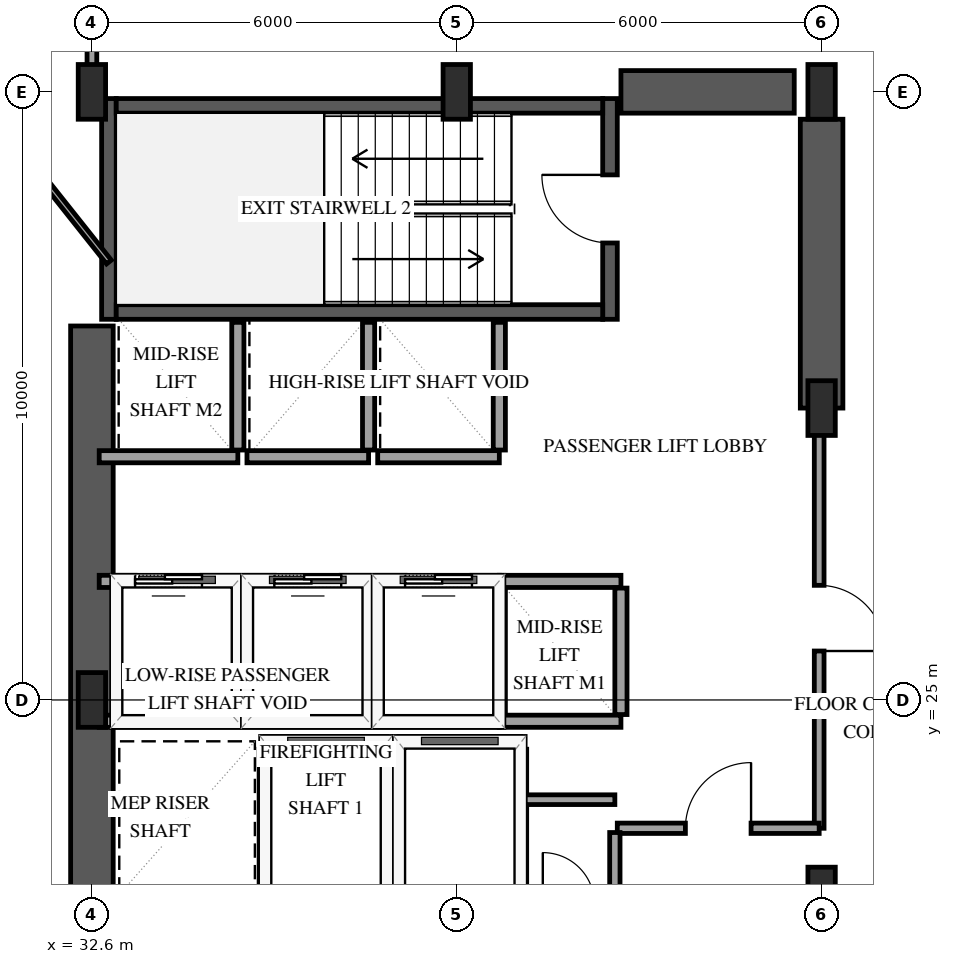
"""IFC4 building model, lengths in metres.
Left out: names, types, materials, properties, quantities, classifications, styles, units other than length and angle.
Written with IfcOpenShell. Run it as: python <this file> out.ifc"""

import sys

from ifc_helpers import new_model, si_unit, direction, frame, frame_2d, origin, origin_2d, place, context, subcontext, project, spatial, rectangle, extrude, element, fill, save


model = new_model("IFC4")
c1 = context("Model", 3, precision=1e-05, world=origin(), true_north=direction((0.0, 1.0)))
c2 = subcontext(c1, "Body", "Model", "MODEL_VIEW")
j1 = project(units=[si_unit("LENGTHUNIT", "METRE"), si_unit("PLANEANGLEUNIT", "RADIAN")], contexts=[c1])
p1 = place(None, origin())
s1 = spatial("IfcSite", under=j1, at=p1, CompositionType="ELEMENT")
p2 = place(p1, origin())
s2 = spatial("IfcBuilding", under=s1, at=p2, CompositionType="ELEMENT")
p3 = place(p2, frame((0.0, 0.0, 50.6)))
s3 = spatial("IfcBuildingStorey", under=s2, at=p3, CompositionType="ELEMENT", Elevation=50.6)
p4 = place(p3, frame((32.88, 31.26, 0.0), z_axis=(0.0, 0.0, 1.0), x_axis=(0.0, 1.0, 0.0)))
e1 = element("IfcWall", 1, at=p4, inside=s3, PredefinedType="SHEAR", context=c2, shape_type="SweptSolid", body=[
    extrude(rectangle(XDim=3.63, YDim=0.24, at=frame_2d((1.815, 0.0))), origin(), (0.0, 0.0, 1.0), 4.0),
])
p5 = place(p3, frame((41.12, 31.26, 0.0), z_axis=(0.0, 0.0, 1.0), x_axis=(0.0, 1.0, 0.0)))
e2 = element("IfcWall", 2, at=p5, inside=s3, PredefinedType="SHEAR", context=c2, shape_type="SweptSolid", body=[
    extrude(rectangle(XDim=3.63, YDim=0.24, at=frame_2d((1.815, 0.0))), origin(), (0.0, 0.0, 1.0), 4.0),
])
p6 = place(p5, frame((1.255, 0.0, 0.0)))
e3 = element("IfcOpeningElement", 3, at=p6, cuts=e2, PredefinedType="OPENING", context=c2, shape_type="SweptSolid", body=[
    extrude(rectangle(XDim=1.12, YDim=2.15, at=frame_2d((0.56, 1.075))), frame((0.0, 0.13, 0.0), z_axis=(0.0, -1.0, 0.0), x_axis=(1.0, 0.0, 0.0)), (0.0, 0.0, 1.0), 0.26),
])
for number, where, z_axis, x_axis in (
    (4, (33.0, 31.38, 0.0), (0.0, 0.0, 1.0), (1.0, 0.0, 0.0)),
    (5, (33.0, 34.77, 0.0), (0.0, 0.0, 1.0), (1.0, 0.0, 0.0)),
):
    element("IfcWall", number, at=place(p3, frame(where, z_axis=z_axis, x_axis=x_axis)), inside=s3, PredefinedType="SHEAR", context=c2, shape_type="SweptSolid", body=[
        extrude(rectangle(XDim=8.0, YDim=0.24, at=frame_2d((4.0, 0.0))), origin(), (0.0, 0.0, 1.0), 4.0),
    ])
p7 = place(p3, frame((32.6, 18.85, 0.0), z_axis=(0.0, 0.0, 1.0), x_axis=(0.0, 1.0, 0.0)))
e6 = element("IfcWall", 6, at=p7, inside=s3, PredefinedType="SHEAR", context=c2, shape_type="SweptSolid", body=[
    extrude(rectangle(XDim=12.3, YDim=0.7, at=frame_2d((6.15, 0.0))), origin(), (0.0, 0.0, 1.0), 4.0),
])
p8 = place(p3, frame((41.3, 35.0, 0.0), z_axis=(0.0, 0.0, 1.0), x_axis=(1.0, 0.0, 0.0)))
e7 = element("IfcWall", 7, at=p8, inside=s3, PredefinedType="SHEAR", context=c2, shape_type="SweptSolid", body=[
    extrude(rectangle(XDim=2.85, YDim=0.7, at=frame_2d((1.425, 0.0))), origin(), (0.0, 0.0, 1.0), 4.0),
])
p9 = place(p3, frame((44.6, 29.8, 0.0), z_axis=(0.0, 0.0, 1.0), x_axis=(0.0, 1.0, 0.0)))
e8 = element("IfcWall", 8, at=p9, inside=s3, PredefinedType="SHEAR", context=c2, shape_type="SweptSolid", body=[
    extrude(rectangle(XDim=4.75, YDim=0.7, at=frame_2d((2.375, 0.0))), origin(), (0.0, 0.0, 1.0), 4.0),
])
for number, where, z_axis, x_axis in (
    (9, (32.6, 25.0, 0.0), (0.0, 0.0, 1.0), (1.0, 0.0, 0.0)),
    (10, (32.6, 35.0, 0.0), (0.0, 0.0, 1.0), (1.0, 0.0, 0.0)),
    (11, (38.6, 35.0, 0.0), (0.0, 0.0, 1.0), (1.0, 0.0, 0.0)),
    (12, (44.6, 21.8, 0.0), (0.0, 0.0, 1.0), (1.0, 0.0, 0.0)),
    (13, (44.6, 29.8, 0.0), (0.0, 0.0, 1.0), (1.0, 0.0, 0.0)),
    (14, (44.6, 35.0, 0.0), (0.0, 0.0, 1.0), (1.0, 0.0, 0.0)),
):
    element("IfcColumn", number, at=place(p3, frame(where, z_axis=z_axis, x_axis=x_axis)), inside=s3, PredefinedType="PILASTER", context=c2, shape_type="SweptSolid", body=[
        extrude(rectangle(XDim=0.45, YDim=0.9, at=origin_2d()), origin(), (0.0, 0.0, 1.0), 4.0),
    ])
p10 = place(p3, frame((35.45, 24.3, 0.0), z_axis=(0.0, 0.0, 1.0), x_axis=(1.0, 0.0, 0.0)))
e15 = element("IfcWall", 15, at=p10, inside=s3, PredefinedType="SOLIDWALL", context=c2, shape_type="SweptSolid", body=[
    extrude(rectangle(XDim=2.0, YDim=0.2, at=frame_2d((1.0, 0.0))), origin(), (0.0, 0.0, 1.0), 3.7),
])
for number, where, z_axis, x_axis in (
    (16, (35.45, 21.81, 0.0), (0.0, 0.0, 1.0), (0.0, 1.0, 0.0)),
    (17, (37.45, 21.81, 0.0), (0.0, 0.0, 1.0), (0.0, 1.0, 0.0)),
):
    element("IfcWall", number, at=place(p3, frame(where, z_axis=z_axis, x_axis=x_axis)), inside=s3, PredefinedType="SOLIDWALL", context=c2, shape_type="SweptSolid", body=[
        extrude(rectangle(XDim=2.38, YDim=0.2, at=frame_2d((1.19, 0.0))), origin(), (0.0, 0.0, 1.0), 3.7),
    ])
p11 = place(p3, frame((37.65, 24.3, 0.0), z_axis=(0.0, 0.0, 1.0), x_axis=(1.0, 0.0, 0.0)))
e18 = element("IfcWall", 18, at=p11, inside=s3, PredefinedType="SOLIDWALL", context=c2, shape_type="SweptSolid", body=[
    extrude(rectangle(XDim=2.0, YDim=0.2, at=frame_2d((1.0, 0.0))), origin(), (0.0, 0.0, 1.0), 3.7),
])
p12 = place(p3, frame((39.65, 21.81, 0.0), z_axis=(0.0, 0.0, 1.0), x_axis=(0.0, 1.0, 0.0)))
e19 = element("IfcWall", 19, at=p12, inside=s3, PredefinedType="SOLIDWALL", context=c2, shape_type="SweptSolid", body=[
    extrude(rectangle(XDim=2.38, YDim=0.2, at=frame_2d((1.19, 0.0))), origin(), (0.0, 0.0, 1.0), 3.7),
])
p13 = place(p3, frame((32.72, 24.65, 0.0), z_axis=(0.0, 0.0, 1.0), x_axis=(1.0, 0.0, 0.0)))
e20 = element("IfcWall", 20, at=p13, inside=s3, PredefinedType="SOLIDWALL", context=c2, shape_type="SweptSolid", body=[
    extrude(rectangle(XDim=2.28, YDim=0.2, at=frame_2d((1.14, 0.0))), origin(), (0.0, 0.0, 1.0), 3.7),
])
p14 = place(p3, frame((32.72, 26.95, 0.0), z_axis=(0.0, 0.0, 1.0), x_axis=(1.0, 0.0, 0.0)))
e21 = element("IfcWall", 21, at=p14, inside=s3, PredefinedType="SOLIDWALL", context=c2, shape_type="SweptSolid", body=[
    extrude(rectangle(XDim=2.28, YDim=0.2, at=frame_2d((1.14, 0.0))), origin(), (0.0, 0.0, 1.0), 3.7),
])
p15 = place(p14, frame((0.59, 0.0, 0.0)))
e22 = element("IfcOpeningElement", 22, at=p15, cuts=e21, PredefinedType="OPENING", context=c2, shape_type="SweptSolid", body=[
    extrude(rectangle(XDim=1.1, YDim=2.15, at=frame_2d((0.55, 1.075))), frame((0.0, 0.11, 0.0), z_axis=(0.0, -1.0, 0.0), x_axis=(1.0, 0.0, 0.0)), (0.0, 0.0, 1.0), 0.22),
])
p16 = place(p3, frame((35.0, 24.76, 0.0), z_axis=(0.0, 0.0, 1.0), x_axis=(0.0, 1.0, 0.0)))
e23 = element("IfcWall", 23, at=p16, inside=s3, PredefinedType="SOLIDWALL", context=c2, shape_type="SweptSolid", body=[
    extrude(rectangle(XDim=2.08, YDim=0.2, at=frame_2d((1.04, 0.0))), origin(), (0.0, 0.0, 1.0), 3.7),
])
p17 = place(p3, frame((35.15, 24.65, 0.0), z_axis=(0.0, 0.0, 1.0), x_axis=(1.0, 0.0, 0.0)))
e24 = element("IfcWall", 24, at=p17, inside=s3, PredefinedType="SOLIDWALL", context=c2, shape_type="SweptSolid", body=[
    extrude(rectangle(XDim=2.0, YDim=0.2, at=frame_2d((1.0, 0.0))), origin(), (0.0, 0.0, 1.0), 3.7),
])
p18 = place(p3, frame((35.15, 26.95, 0.0), z_axis=(0.0, 0.0, 1.0), x_axis=(1.0, 0.0, 0.0)))
e25 = element("IfcWall", 25, at=p18, inside=s3, PredefinedType="SOLIDWALL", context=c2, shape_type="SweptSolid", body=[
    extrude(rectangle(XDim=2.0, YDim=0.2, at=frame_2d((1.0, 0.0))), origin(), (0.0, 0.0, 1.0), 3.7),
])
p19 = place(p18, frame((0.45, 0.0, 0.0)))
e26 = element("IfcOpeningElement", 26, at=p19, cuts=e25, PredefinedType="OPENING", context=c2, shape_type="SweptSolid", body=[
    extrude(rectangle(XDim=1.1, YDim=2.15, at=frame_2d((0.55, 1.075))), frame((0.0, 0.11, 0.0), z_axis=(0.0, -1.0, 0.0), x_axis=(1.0, 0.0, 0.0)), (0.0, 0.0, 1.0), 0.22),
])
p20 = place(p3, frame((37.15, 24.76, 0.0), z_axis=(0.0, 0.0, 1.0), x_axis=(0.0, 1.0, 0.0)))
e27 = element("IfcWall", 27, at=p20, inside=s3, PredefinedType="SOLIDWALL", context=c2, shape_type="SweptSolid", body=[
    extrude(rectangle(XDim=2.08, YDim=0.2, at=frame_2d((1.04, 0.0))), origin(), (0.0, 0.0, 1.0), 3.7),
])
p21 = place(p3, frame((37.3, 24.65, 0.0), z_axis=(0.0, 0.0, 1.0), x_axis=(1.0, 0.0, 0.0)))
e28 = element("IfcWall", 28, at=p21, inside=s3, PredefinedType="SOLIDWALL", context=c2, shape_type="SweptSolid", body=[
    extrude(rectangle(XDim=2.0, YDim=0.2, at=frame_2d((1.0, 0.0))), origin(), (0.0, 0.0, 1.0), 3.7),
])
p22 = place(p3, frame((37.3, 26.95, 0.0), z_axis=(0.0, 0.0, 1.0), x_axis=(1.0, 0.0, 0.0)))
e29 = element("IfcWall", 29, at=p22, inside=s3, PredefinedType="SOLIDWALL", context=c2, shape_type="SweptSolid", body=[
    extrude(rectangle(XDim=2.0, YDim=0.2, at=frame_2d((1.0, 0.0))), origin(), (0.0, 0.0, 1.0), 3.7),
])
p23 = place(p22, frame((0.45, 0.0, 0.0)))
e30 = element("IfcOpeningElement", 30, at=p23, cuts=e29, PredefinedType="OPENING", context=c2, shape_type="SweptSolid", body=[
    extrude(rectangle(XDim=1.1, YDim=2.15, at=frame_2d((0.55, 1.075))), frame((0.0, 0.11, 0.0), z_axis=(0.0, -1.0, 0.0), x_axis=(1.0, 0.0, 0.0)), (0.0, 0.0, 1.0), 0.22),
])
p24 = place(p3, frame((39.3, 24.76, 0.0), z_axis=(0.0, 0.0, 1.0), x_axis=(0.0, 1.0, 0.0)))
e31 = element("IfcWall", 31, at=p24, inside=s3, PredefinedType="SOLIDWALL", context=c2, shape_type="SweptSolid", body=[
    extrude(rectangle(XDim=2.08, YDim=0.2, at=frame_2d((1.04, 0.0))), origin(), (0.0, 0.0, 1.0), 3.7),
])
for number, where, z_axis, x_axis in (
    (32, (39.3, 24.65, 0.0), (0.0, 0.0, 1.0), (1.0, 0.0, 0.0)),
    (33, (39.3, 26.95, 0.0), (0.0, 0.0, 1.0), (1.0, 0.0, 0.0)),
):
    element("IfcWall", number, at=place(p3, frame(where, z_axis=z_axis, x_axis=x_axis)), inside=s3, PredefinedType="SOLIDWALL", context=c2, shape_type="SweptSolid", body=[
        extrude(rectangle(XDim=2.0, YDim=0.2, at=frame_2d((1.0, 0.0))), origin(), (0.0, 0.0, 1.0), 3.7),
    ])
p25 = place(p3, frame((41.3, 24.76, 0.0), z_axis=(0.0, 0.0, 1.0), x_axis=(0.0, 1.0, 0.0)))
e34 = element("IfcWall", 34, at=p25, inside=s3, PredefinedType="SOLIDWALL", context=c2, shape_type="SweptSolid", body=[
    extrude(rectangle(XDim=2.08, YDim=0.2, at=frame_2d((1.04, 0.0))), origin(), (0.0, 0.0, 1.0), 3.7),
])
p26 = place(p3, frame((32.72, 29.0, 0.0), z_axis=(0.0, 0.0, 1.0), x_axis=(1.0, 0.0, 0.0)))
e35 = element("IfcWall", 35, at=p26, inside=s3, PredefinedType="SOLIDWALL", context=c2, shape_type="SweptSolid", body=[
    extrude(rectangle(XDim=2.28, YDim=0.2, at=frame_2d((1.14, 0.0))), origin(), (0.0, 0.0, 1.0), 3.7),
])
p27 = place(p3, frame((35.0, 29.11, 0.0), z_axis=(0.0, 0.0, 1.0), x_axis=(0.0, 1.0, 0.0)))
e36 = element("IfcWall", 36, at=p27, inside=s3, PredefinedType="SOLIDWALL", context=c2, shape_type="SweptSolid", body=[
    extrude(rectangle(XDim=2.1, YDim=0.2, at=frame_2d((1.05, 0.0))), origin(), (0.0, 0.0, 1.0), 3.7),
])
p28 = place(p3, frame((35.15, 29.0, 0.0), z_axis=(0.0, 0.0, 1.0), x_axis=(1.0, 0.0, 0.0)))
e37 = element("IfcWall", 37, at=p28, inside=s3, PredefinedType="SOLIDWALL", context=c2, shape_type="SweptSolid", body=[
    extrude(rectangle(XDim=2.0, YDim=0.2, at=frame_2d((1.0, 0.0))), origin(), (0.0, 0.0, 1.0), 3.7),
])
p29 = place(p3, frame((37.15, 29.11, 0.0), z_axis=(0.0, 0.0, 1.0), x_axis=(0.0, 1.0, 0.0)))
e38 = element("IfcWall", 38, at=p29, inside=s3, PredefinedType="SOLIDWALL", context=c2, shape_type="SweptSolid", body=[
    extrude(rectangle(XDim=2.1, YDim=0.2, at=frame_2d((1.05, 0.0))), origin(), (0.0, 0.0, 1.0), 3.7),
])
p30 = place(p3, frame((37.3, 29.0, 0.0), z_axis=(0.0, 0.0, 1.0), x_axis=(1.0, 0.0, 0.0)))
e39 = element("IfcWall", 39, at=p30, inside=s3, PredefinedType="SOLIDWALL", context=c2, shape_type="SweptSolid", body=[
    extrude(rectangle(XDim=2.0, YDim=0.2, at=frame_2d((1.0, 0.0))), origin(), (0.0, 0.0, 1.0), 3.7),
])
p31 = place(p3, frame((39.3, 29.11, 0.0), z_axis=(0.0, 0.0, 1.0), x_axis=(0.0, 1.0, 0.0)))
e40 = element("IfcWall", 40, at=p31, inside=s3, PredefinedType="SOLIDWALL", context=c2, shape_type="SweptSolid", body=[
    extrude(rectangle(XDim=2.1, YDim=0.2, at=frame_2d((1.05, 0.0))), origin(), (0.0, 0.0, 1.0), 3.7),
])
p32 = place(p3, frame((32.88, 32.202, 0.0), z_axis=(0.0, 0.0, 1.0), x_axis=(-0.621908178435, 0.783090172072, 0.0)))
e41 = element("IfcWall", 41, at=p32, inside=s3, PredefinedType="PARTITIONING", context=c2, shape_type="SweptSolid", body=[
    extrude(rectangle(XDim=7.104, YDim=0.1, at=frame_2d((3.552, 0.0))), origin(), (0.0, 0.0, 1.0), 3.7),
])
p33 = place(p3, frame((44.56, 29.8, 0.0), z_axis=(0.0, 0.0, 1.0), x_axis=(0.0, -1.0, 0.0)))
e42 = element("IfcWall", 42, at=p33, inside=s3, PredefinedType="PARTITIONING", context=c2, shape_type="SweptSolid", body=[
    extrude(rectangle(XDim=6.91, YDim=0.16, at=frame_2d((3.455, 0.0))), origin(), (0.0, 0.0, 1.0), 2.74),
])
p34 = place(p33, frame((2.915, 0.0, 0.0)))
e43 = element("IfcOpeningElement", 43, at=p34, cuts=e42, PredefinedType="OPENING", context=c2, shape_type="SweptSolid", body=[
    extrude(rectangle(XDim=1.08, YDim=2.15, at=frame_2d((0.54, 1.075))), frame((0.0, 0.09, 0.0), z_axis=(0.0, -1.0, 0.0), x_axis=(1.0, 0.0, 0.0)), (0.0, 0.0, 1.0), 0.18),
])
p35 = place(p3, frame((41.24, 22.89, 0.0), z_axis=(0.0, 0.0, 1.0), x_axis=(1.0, 0.0, 0.0)))
e44 = element("IfcWall", 44, at=p35, inside=s3, PredefinedType="PARTITIONING", context=c2, shape_type="SweptSolid", body=[
    extrude(rectangle(XDim=3.32, YDim=0.17, at=frame_2d((1.66, 0.0))), origin(), (0.0, 0.0, 1.0), 3.7),
])
p36 = place(p35, frame((1.12, 0.0, 0.0)))
e45 = element("IfcOpeningElement", 45, at=p36, cuts=e44, PredefinedType="OPENING", context=c2, shape_type="SweptSolid", body=[
    extrude(rectangle(XDim=1.08, YDim=2.15, at=frame_2d((0.54, 1.075))), frame((0.0, 0.095, 0.0), z_axis=(0.0, -1.0, 0.0), x_axis=(1.0, 0.0, 0.0)), (0.0, 0.0, 1.0), 0.19),
])
p37 = place(p3, frame((32.6, 35.07, 0.0), z_axis=(0.0, 0.0, 1.0), x_axis=(0.0, 1.0, 0.0)))
e46 = element("IfcWall", 46, at=p37, inside=s3, PredefinedType="PARTITIONING", context=c2, shape_type="SweptSolid", body=[
    extrude(rectangle(XDim=1.91, YDim=0.16, at=frame_2d((0.955, 0.0))), origin(), (0.0, 0.0, 1.0), 3.7),
])
p38 = place(p3, frame((41.2, 21.7, 0.0), z_axis=(0.0, 0.0, 1.0), x_axis=(0.0, 1.0, 0.0)))
e47 = element("IfcWall", 47, at=p38, inside=s3, PredefinedType="PARTITIONING", context=c2, shape_type="SweptSolid", body=[
    extrude(rectangle(XDim=1.12, YDim=0.17, at=frame_2d((0.56, 0.0))), origin(), (0.0, 0.0, 1.0), 3.7),
])
p39 = place(p3, frame((41.2, 23.36, 0.0), z_axis=(0.0, 0.0, 1.0), x_axis=(-1.0, 0.0, 0.0)))
e48 = element("IfcWall", 48, at=p39, inside=s3, PredefinedType="PARTITIONING", context=c2, shape_type="SweptSolid", body=[
    extrude(rectangle(XDim=1.48, YDim=0.16, at=frame_2d((0.74, 0.0))), origin(), (0.0, 0.0, 1.0), 3.7),
])
p40 = place(p15, origin())
e49 = element("IfcDoor", 49, at=p40, inside=s3, OperationType="SLIDING_TO_LEFT", PredefinedType="DOOR", context=c2, shape_type="SweptSolid", body=[
    extrude(rectangle(XDim=1.1, YDim=2.15, at=frame_2d((0.55, 1.075))), frame((0.0, 0.025, 0.0), z_axis=(0.0, -1.0, 0.0), x_axis=(1.0, 0.0, 0.0)), (0.0, 0.0, 1.0), 0.05),
])
fill(e22, e49)
p41 = place(p19, origin())
e50 = element("IfcDoor", 50, at=p41, inside=s3, OperationType="SLIDING_TO_LEFT", PredefinedType="DOOR", context=c2, shape_type="SweptSolid", body=[
    extrude(rectangle(XDim=1.1, YDim=2.15, at=frame_2d((0.55, 1.075))), frame((0.0, 0.025, 0.0), z_axis=(0.0, -1.0, 0.0), x_axis=(1.0, 0.0, 0.0)), (0.0, 0.0, 1.0), 0.05),
])
fill(e26, e50)
p42 = place(p23, origin())
e51 = element("IfcDoor", 51, at=p42, inside=s3, OperationType="SLIDING_TO_LEFT", PredefinedType="DOOR", context=c2, shape_type="SweptSolid", body=[
    extrude(rectangle(XDim=1.1, YDim=2.15, at=frame_2d((0.55, 1.075))), frame((0.0, 0.025, 0.0), z_axis=(0.0, -1.0, 0.0), x_axis=(1.0, 0.0, 0.0)), (0.0, 0.0, 1.0), 0.05),
])
fill(e30, e51)
p43 = place(p6, origin())
e52 = element("IfcDoor", 52, at=p43, inside=s3, OperationType="SINGLE_SWING_RIGHT", PredefinedType="DOOR", context=c2, shape_type="SweptSolid", body=[
    extrude(rectangle(XDim=1.12, YDim=2.15, at=frame_2d((0.56, 1.075))), frame((0.0, 0.025, 0.0), z_axis=(0.0, -1.0, 0.0), x_axis=(1.0, 0.0, 0.0)), (0.0, 0.0, 1.0), 0.05),
])
fill(e3, e52)
p44 = place(p34, origin())
e53 = element("IfcDoor", 53, at=p44, inside=s3, OperationType="SINGLE_SWING_RIGHT", PredefinedType="DOOR", context=c2, shape_type="SweptSolid", body=[
    extrude(rectangle(XDim=1.08, YDim=2.15, at=frame_2d((0.54, 1.075))), frame((0.0, 0.025, 0.0), z_axis=(0.0, -1.0, 0.0), x_axis=(1.0, 0.0, 0.0)), (0.0, 0.0, 1.0), 0.05),
])
fill(e43, e53)
p45 = place(p36, origin())
e54 = element("IfcDoor", 54, at=p45, inside=s3, OperationType="SINGLE_SWING_RIGHT", PredefinedType="DOOR", context=c2, shape_type="SweptSolid", body=[
    extrude(rectangle(XDim=1.08, YDim=2.15, at=frame_2d((0.54, 1.075))), frame((0.0, 0.025, 0.0), z_axis=(0.0, -1.0, 0.0), x_axis=(1.0, 0.0, 0.0)), (0.0, 0.0, 1.0), 0.05),
])
fill(e45, e54)
save(model, sys.argv[1])
